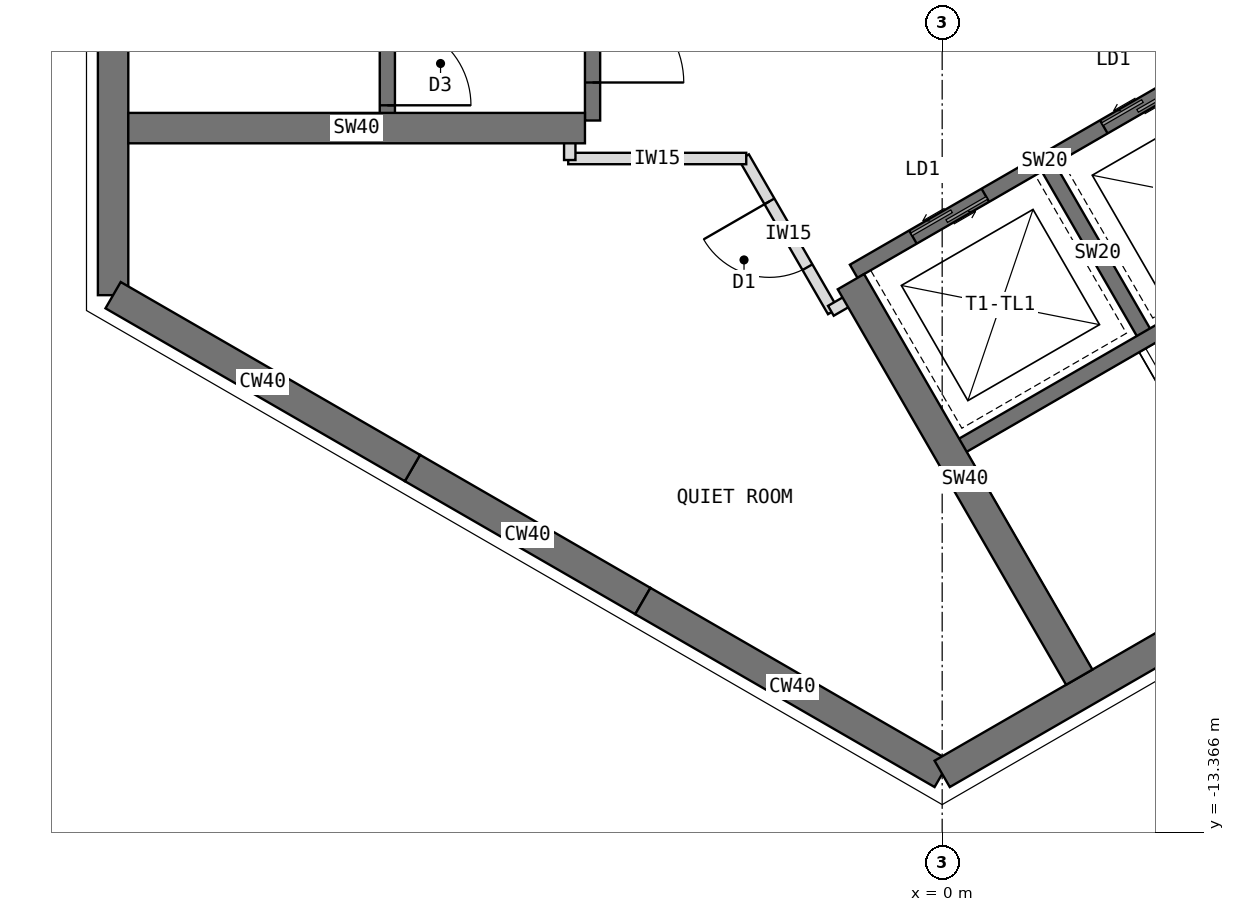
"""IFC4 building model, lengths in metres.
Left out: names, types, materials, properties, quantities, classifications, styles, units other than length and angle.
Written with IfcOpenShell. Run it as: python <this file> out.ifc"""

import sys

from ifc_helpers import new_model, si_unit, direction, frame, frame_2d, origin, place, context, subcontext, project, spatial, rectangle, extrude, element, fill, save


model = new_model("IFC4")
c1 = context("Model", 3, precision=1e-05, world=origin(), true_north=direction((0.0, 1.0)))
c2 = subcontext(c1, "Body", "Model", "MODEL_VIEW")
j1 = project(units=[si_unit("LENGTHUNIT", "METRE"), si_unit("PLANEANGLEUNIT", "RADIAN")], contexts=[c1])
p1 = place(None, origin())
s1 = spatial("IfcSite", under=j1, at=p1, CompositionType="ELEMENT")
p2 = place(p1, origin())
s2 = spatial("IfcBuilding", under=s1, at=p2, CompositionType="ELEMENT")
p3 = place(p2, frame((0.0, 0.0, 259.5)))
s3 = spatial("IfcBuildingStorey", under=s2, at=p3, CompositionType="ELEMENT", Elevation=259.5)
p4 = place(p3, frame((-10.908, 6.298, 0.0), z_axis=(0.0, 0.0, 1.0), x_axis=(0.0, -1.0, 0.0)))
e1 = element("IfcWall", 1, at=p4, inside=s3, PredefinedType="SHEAR", context=c2, shape_type="SweptSolid", body=[
    extrude(rectangle(XDim=12.596, YDim=0.4, at=frame_2d((6.298, 0.0))), origin(), (0.0, 0.0, 1.0), 4.0),
])
p5 = place(p3, frame((-10.908, -6.298, 0.0), z_axis=(0.0, 0.0, 1.0), x_axis=(0.866034513004, -0.499984222037, 0.0)))
e2 = element("IfcWall", 2, at=p5, inside=s3, PredefinedType="SHEAR", context=c2, shape_type="SweptSolid", body=[
    extrude(rectangle(XDim=4.548, YDim=0.4, at=frame_2d((2.274, 0.0))), origin(), (0.0, 0.0, 1.0), 4.0),
])
p6 = place(p3, frame((-6.97, -8.572, 0.0), z_axis=(0.0, 0.0, 1.0), x_axis=(0.866019471182, -0.500010275428, 0.0)))
e3 = element("IfcWall", 3, at=p6, inside=s3, PredefinedType="SHEAR", context=c2, shape_type="SweptSolid", body=[
    extrude(rectangle(XDim=3.5, YDim=0.4, at=frame_2d((1.75, 0.0))), origin(), (0.0, 0.0, 1.0), 4.0),
])
p7 = place(p3, frame((-3.939, -10.322, 0.0), z_axis=(0.0, 0.0, 1.0), x_axis=(0.866011268655, -0.500024481964, 0.0)))
e4 = element("IfcWall", 4, at=p7, inside=s3, PredefinedType="SHEAR", context=c2, shape_type="SweptSolid", body=[
    extrude(rectangle(XDim=4.548, YDim=0.4, at=frame_2d((2.274, 0.0))), origin(), (0.0, 0.0, 1.0), 4.0),
])
p8 = place(p3, frame((0.0, -12.596, 0.0), z_axis=(0.0, 0.0, 1.0), x_axis=(0.866021940709, 0.500005998175, 0.0)))
e5 = element("IfcWall", 5, at=p8, inside=s3, PredefinedType="SHEAR", context=c2, shape_type="SweptSolid", body=[
    extrude(rectangle(XDim=12.596, YDim=0.4, at=frame_2d((6.298, 0.0))), origin(), (0.0, 0.0, 1.0), 4.0),
])
p9 = place(p3, frame((-4.6, 4.0, 0.0), z_axis=(0.0, 0.0, 1.0), x_axis=(0.0, -1.0, 0.0)))
e6 = element("IfcWall", 6, at=p9, inside=s3, PredefinedType="SHEAR", context=c2, shape_type="SweptSolid", body=[
    extrude(rectangle(XDim=8.0, YDim=0.2, at=frame_2d((4.0, 0.0))), origin(), (0.0, 0.0, 1.0), 4.0),
])
p10 = place(p9, frame((6.3, 0.0, 0.0)))
e7 = element("IfcOpeningElement", 7, at=p10, cuts=e6, PredefinedType="OPENING", context=c2, shape_type="SweptSolid", body=[
    extrude(rectangle(XDim=1.2, YDim=2.1, at=frame_2d((0.6, 1.05))), frame((0.0, 0.11, 0.0), z_axis=(0.0, -1.0, 0.0), x_axis=(1.0, 0.0, 0.0)), (0.0, 0.0, 1.0), 0.22),
])
p11 = place(p9, frame((0.9, 0.0, 0.0)))
e8 = element("IfcOpeningElement", 8, at=p11, cuts=e6, PredefinedType="OPENING", context=c2, shape_type="SweptSolid", body=[
    extrude(rectangle(XDim=1.1, YDim=2.2, at=frame_2d((0.55, 1.1))), frame((0.0, 0.11, 0.0), z_axis=(0.0, -1.0, 0.0), x_axis=(1.0, 0.0, 0.0)), (0.0, 0.0, 1.0), 0.22),
])
p12 = place(p3, frame((-7.3, 4.0, 0.0), z_axis=(0.0, 0.0, 1.0), x_axis=(0.0, -1.0, 0.0)))
e9 = element("IfcWall", 9, at=p12, inside=s3, PredefinedType="SHEAR", context=c2, shape_type="SweptSolid", body=[
    extrude(rectangle(XDim=8.0, YDim=0.2, at=frame_2d((4.0, 0.0))), origin(), (0.0, 0.0, 1.0), 4.0),
])
p13 = place(p12, frame((6.7, 0.0, 0.0)))
e10 = element("IfcOpeningElement", 10, at=p13, cuts=e9, PredefinedType="OPENING", context=c2, shape_type="SweptSolid", body=[
    extrude(rectangle(XDim=1.1, YDim=2.1, at=frame_2d((0.55, 1.05))), frame((0.0, 0.11, 0.0), z_axis=(0.0, -1.0, 0.0), x_axis=(1.0, 0.0, 0.0)), (0.0, 0.0, 1.0), 0.22),
])
p14 = place(p3, frame((-4.7, -4.1, 0.0), z_axis=(0.0, 0.0, 1.0), x_axis=(-1.0, 0.0, 0.0)))
e11 = element("IfcWall", 11, at=p14, inside=s3, PredefinedType="SHEAR", context=c2, shape_type="SweptSolid", body=[
    extrude(rectangle(XDim=6.008, YDim=0.4, at=frame_2d((3.004, 0.0))), origin(), (0.0, 0.0, 1.0), 4.0),
])
p15 = place(p3, frame((-1.164, -5.984, 0.0), z_axis=(0.0, 0.0, 1.0), x_axis=(0.866026010844, 0.49999894854, 0.0)))
e12 = element("IfcWall", 12, at=p15, inside=s3, PredefinedType="SHEAR", context=c2, shape_type="SweptSolid", body=[
    extrude(rectangle(XDim=8.0, YDim=0.2, at=frame_2d((4.0, 0.0))), origin(), (0.0, 0.0, 1.0), 4.0),
])
p16 = place(p15, frame((6.3, 0.0, 0.0)))
e13 = element("IfcOpeningElement", 13, at=p16, cuts=e12, PredefinedType="OPENING", context=c2, shape_type="SweptSolid", body=[
    extrude(rectangle(XDim=1.2, YDim=2.1, at=frame_2d((0.6, 1.05))), frame((0.0, 0.11, 0.0), z_axis=(0.0, -1.0, 0.0), x_axis=(1.0, 0.0, 0.0)), (0.0, 0.0, 1.0), 0.22),
])
p17 = place(p15, frame((0.9, 0.0, 0.0)))
e14 = element("IfcOpeningElement", 14, at=p17, cuts=e12, PredefinedType="OPENING", context=c2, shape_type="SweptSolid", body=[
    extrude(rectangle(XDim=1.1, YDim=2.2, at=frame_2d((0.55, 1.1))), frame((0.0, 0.11, 0.0), z_axis=(0.0, -1.0, 0.0), x_axis=(1.0, 0.0, 0.0)), (0.0, 0.0, 1.0), 0.22),
])
p18 = place(p15, frame((3.8, 0.0, 0.0)))
e15 = element("IfcOpeningElement", 15, at=p18, cuts=e12, PredefinedType="OPENING", context=c2, shape_type="SweptSolid", body=[
    extrude(rectangle(XDim=1.1, YDim=2.2, at=frame_2d((0.55, 1.1))), frame((0.0, 0.11, 0.0), z_axis=(0.0, -1.0, 0.0), x_axis=(1.0, 0.0, 0.0)), (0.0, 0.0, 1.0), 0.22),
])
p19 = place(p3, frame((1.397, -4.62, 0.0), z_axis=(0.0, 0.0, 1.0), x_axis=(0.499936506574, -0.866062058628, 0.0)))
e16 = element("IfcWall", 16, at=p19, inside=s3, PredefinedType="SHEAR", context=c2, shape_type="SweptSolid", body=[
    extrude(rectangle(XDim=2.6, YDim=0.2, at=frame_2d((1.3, 0.0))), origin(), (0.0, 0.0, 1.0), 4.0),
])
p20 = place(p3, frame((0.186, -8.322, 0.0), z_axis=(0.0, 0.0, 1.0), x_axis=(0.866026010844, 0.49999894854, 0.0)))
e17 = element("IfcWall", 17, at=p20, inside=s3, PredefinedType="SHEAR", context=c2, shape_type="SweptSolid", body=[
    extrude(rectangle(XDim=8.0, YDim=0.2, at=frame_2d((4.0, 0.0))), origin(), (0.0, 0.0, 1.0), 4.0),
])
p21 = place(p20, frame((6.7, 0.0, 0.0)))
e18 = element("IfcOpeningElement", 18, at=p21, cuts=e17, PredefinedType="OPENING", context=c2, shape_type="SweptSolid", body=[
    extrude(rectangle(XDim=1.1, YDim=2.1, at=frame_2d((0.55, 1.05))), frame((0.0, 0.11, 0.0), z_axis=(0.0, -1.0, 0.0), x_axis=(1.0, 0.0, 0.0)), (0.0, 0.0, 1.0), 0.22),
])
p22 = place(p3, frame((-1.201, -6.12, 0.0), z_axis=(0.0, 0.0, 1.0), x_axis=(0.499997979876, -0.866026570101, 0.0)))
e19 = element("IfcWall", 19, at=p22, inside=s3, PredefinedType="SHEAR", context=c2, shape_type="SweptSolid", body=[
    extrude(rectangle(XDim=6.008, YDim=0.4, at=frame_2d((3.004, 0.0))), origin(), (0.0, 0.0, 1.0), 4.0),
])
p23 = place(p3, frame((-1.437, -6.511, 0.0), z_axis=(0.0, 0.0, 1.0), x_axis=(-0.500074377092, 0.865982457891, 0.0)))
e20 = element("IfcWall", 20, at=p23, inside=s3, PredefinedType="PARTITIONING", context=c2, shape_type="SweptSolid", body=[
    extrude(rectangle(XDim=2.342, YDim=0.15, at=frame_2d((1.171, 0.0))), origin(), (0.0, 0.0, 1.0), 3.8),
])
p24 = place(p23, frame((0.671, 0.0, 0.0)))
e21 = element("IfcOpeningElement", 21, at=p24, cuts=e20, PredefinedType="OPENING", context=c2, shape_type="SweptSolid", body=[
    extrude(rectangle(XDim=1.0, YDim=2.1, at=frame_2d((0.5, 1.05))), frame((0.0, 0.085, 0.0), z_axis=(0.0, -1.0, 0.0), x_axis=(1.0, 0.0, 0.0)), (0.0, 0.0, 1.0), 0.17),
])
p25 = place(p3, frame((-2.578, -4.5, 0.0), z_axis=(0.0, 0.0, 1.0), x_axis=(-1.0, 0.0, 0.0)))
e22 = element("IfcWall", 22, at=p25, inside=s3, PredefinedType="PARTITIONING", context=c2, shape_type="SweptSolid", body=[
    extrude(rectangle(XDim=2.342, YDim=0.15, at=frame_2d((1.171, 0.0))), origin(), (0.0, 0.0, 1.0), 3.8),
])
for number, where, z_axis, x_axis in (
    (23, (-4.9, -4.52, 0.0), (0.0, 0.0, 1.0), (0.0, 1.0, 0.0)),
    (24, (-1.092, -6.289, 0.0), (0.0, 0.0, 1.0), (-0.866, -0.5, 0.0)),
):
    element("IfcWall", number, at=place(p3, frame(where, z_axis=z_axis, x_axis=x_axis)), inside=s3, PredefinedType="PARTITIONING", context=c2, shape_type="SweptSolid", body=[
        extrude(rectangle(XDim=0.43, YDim=0.15, at=frame_2d((0.215, 0.0))), origin(), (0.0, 0.0, 1.0), 3.8),
    ])
p26 = place(p10, origin())
e25 = element("IfcDoor", 25, at=p26, inside=s3, OperationType="SINGLE_SWING_RIGHT", PredefinedType="DOOR", context=c2, shape_type="SweptSolid", body=[
    extrude(rectangle(XDim=1.2, YDim=2.1, at=frame_2d((0.6, 1.05))), frame((0.0, 0.025, 0.0), z_axis=(0.0, -1.0, 0.0), x_axis=(1.0, 0.0, 0.0)), (0.0, 0.0, 1.0), 0.05),
])
fill(e7, e25)
p27 = place(p13, origin())
e26 = element("IfcDoor", 26, at=p27, inside=s3, OperationType="SINGLE_SWING_RIGHT", PredefinedType="DOOR", context=c2, shape_type="SweptSolid", body=[
    extrude(rectangle(XDim=1.1, YDim=2.1, at=frame_2d((0.55, 1.05))), frame((0.0, 0.025, 0.0), z_axis=(0.0, -1.0, 0.0), x_axis=(1.0, 0.0, 0.0)), (0.0, 0.0, 1.0), 0.05),
])
fill(e10, e26)
p28 = place(p17, origin())
e27 = element("IfcDoor", 27, at=p28, inside=s3, OperationType="DOUBLE_DOOR_SLIDING", PredefinedType="DOOR", context=c2, shape_type="SweptSolid", body=[
    extrude(rectangle(XDim=1.1, YDim=2.2, at=frame_2d((0.55, 1.1))), frame((0.0, 0.025, 0.0), z_axis=(0.0, -1.0, 0.0), x_axis=(1.0, 0.0, 0.0)), (0.0, 0.0, 1.0), 0.05),
])
fill(e14, e27)
p29 = place(p18, origin())
e28 = element("IfcDoor", 28, at=p29, inside=s3, OperationType="DOUBLE_DOOR_SLIDING", PredefinedType="DOOR", context=c2, shape_type="SweptSolid", body=[
    extrude(rectangle(XDim=1.1, YDim=2.2, at=frame_2d((0.55, 1.1))), frame((0.0, 0.025, 0.0), z_axis=(0.0, -1.0, 0.0), x_axis=(1.0, 0.0, 0.0)), (0.0, 0.0, 1.0), 0.05),
])
fill(e15, e28)
p30 = place(p24, origin())
e29 = element("IfcDoor", 29, at=p30, inside=s3, OperationType="SINGLE_SWING_RIGHT", PredefinedType="DOOR", context=c2, shape_type="SweptSolid", body=[
    extrude(rectangle(XDim=1.0, YDim=2.1, at=frame_2d((0.5, 1.05))), frame((0.0, 0.025, 0.0), z_axis=(0.0, -1.0, 0.0), x_axis=(1.0, 0.0, 0.0)), (0.0, 0.0, 1.0), 0.05),
])
fill(e21, e29)
save(model, sys.argv[1])
